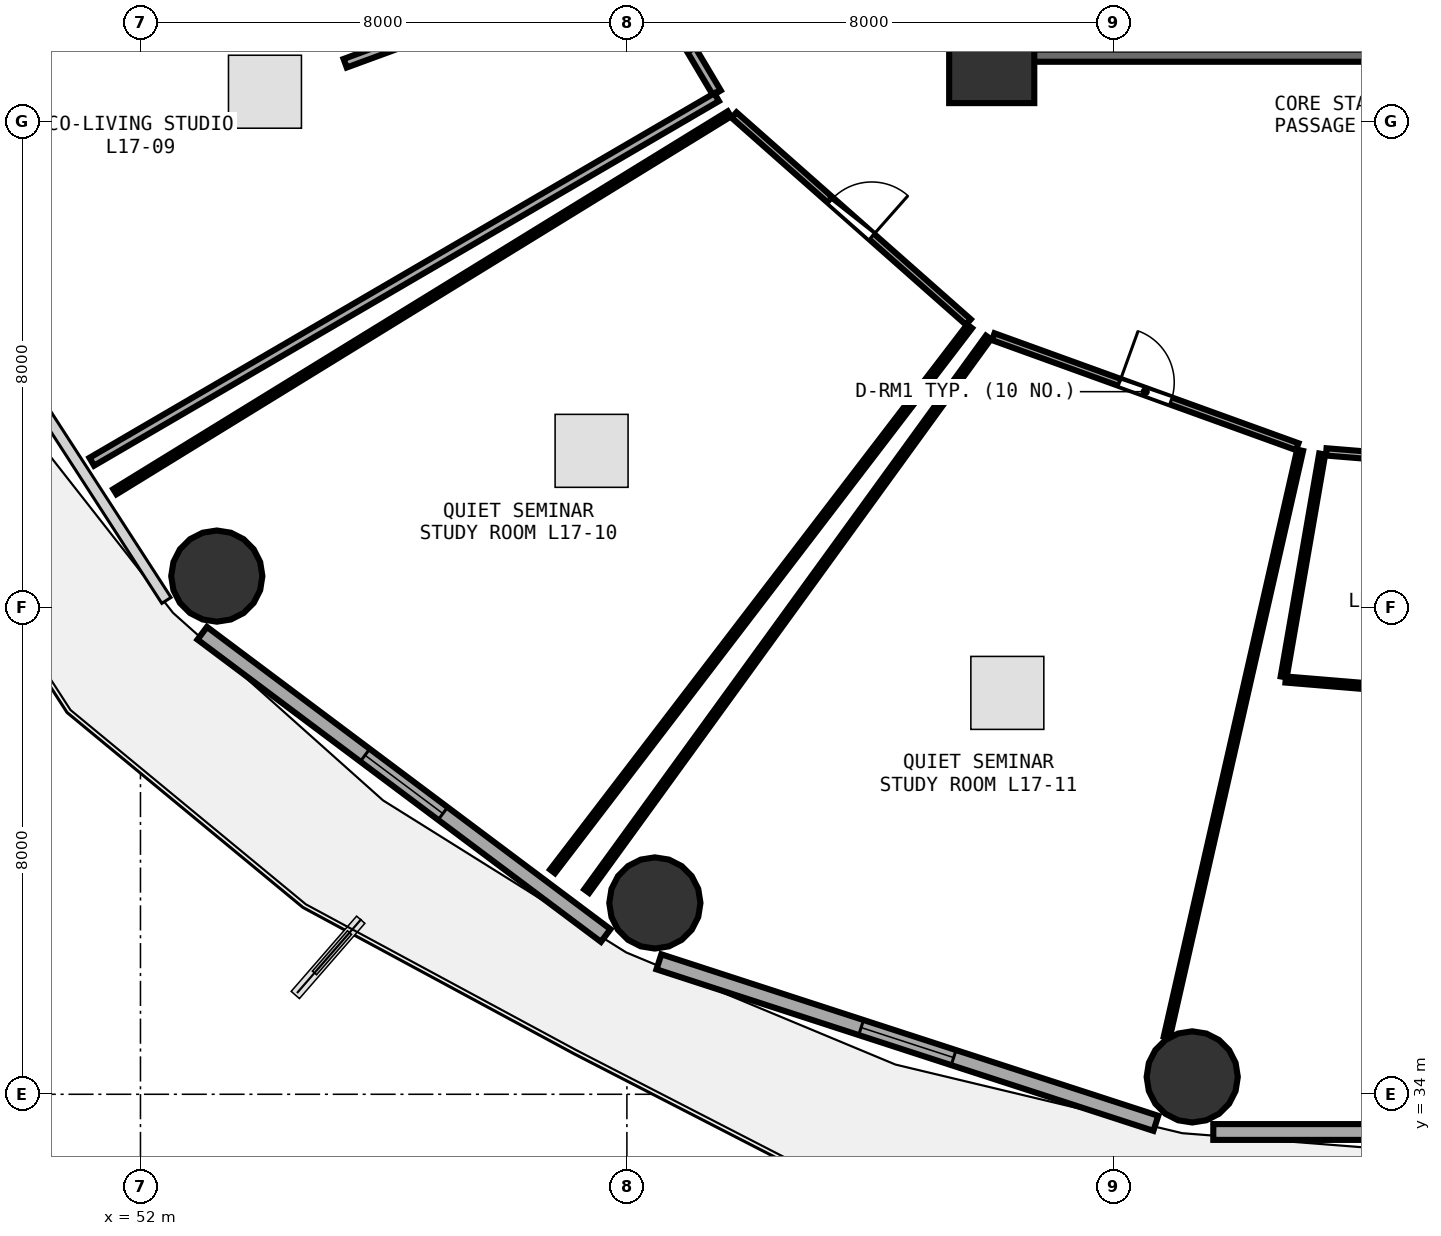
"""IFC4 building model, lengths in metres.
Left out: names, types, materials, properties, quantities, classifications, styles, units other than length and angle.
Written with IfcOpenShell. Run it as: python <this file> out.ifc"""

import sys

from ifc_helpers import new_model, si_unit, direction, frame, frame_2d, origin, origin_2d, place, context, subcontext, project, spatial, rectangle, circle, extrude, element, fill, save


model = new_model("IFC4")
c1 = context("Model", 3, precision=1e-05, world=origin(), true_north=direction((0.0, 1.0)))
c2 = subcontext(c1, "Body", "Model", "MODEL_VIEW")
j1 = project(units=[si_unit("LENGTHUNIT", "METRE"), si_unit("PLANEANGLEUNIT", "RADIAN")], contexts=[c1])
p1 = place(None, origin())
s1 = spatial("IfcSite", under=j1, at=p1, CompositionType="ELEMENT")
p2 = place(p1, origin())
s2 = spatial("IfcBuilding", under=s1, at=p2, CompositionType="ELEMENT")
p3 = place(p2, frame((0.0, 0.0, 67.5)))
s3 = spatial("IfcBuildingStorey", under=s2, at=p3, CompositionType="ELEMENT", Elevation=67.5)
p4 = place(p3, frame((66.0, 51.0, 0.0), z_axis=(0.0, 0.0, 1.0), x_axis=(1.0, 0.0, 0.0)))
e1 = element("IfcColumn", 1, at=p4, inside=s3, PredefinedType="PILASTER", context=c2, shape_type="SweptSolid", body=[
    extrude(rectangle(XDim=1.4, YDim=1.4, at=origin_2d()), origin(), (0.0, 0.0, 1.0), 4.76),
])
for number, where, z_axis, x_axis in (
    (2, (53.256, 42.522, 0.0), (0.0, 0.0, 1.0), (1.0, 0.0, 0.0)),
    (3, (60.46, 37.146, 0.0), (0.0, 0.0, 1.0), (1.0, 0.0, 0.0)),
    (4, (69.298, 34.286, 0.0), (0.0, 0.0, 1.0), (1.0, 0.0, 0.0)),
):
    element("IfcColumn", number, at=place(p3, frame(where, z_axis=z_axis, x_axis=x_axis)), inside=s3, PredefinedType="COLUMN", context=c2, shape_type="SweptSolid", body=[
        extrude(circle(Radius=0.75, at=origin_2d()), origin(), (0.0, 0.0, 1.0), 4.76),
    ])
p5 = place(p3, frame((53.016, 41.582, 0.0), z_axis=(0.0, 0.0, 1.0), x_axis=(0.80030733173, -0.599590005569, 0.0)))
e5 = element("IfcWall", 5, at=p5, inside=s3, PredefinedType="SOLIDWALL", context=c2, shape_type="SweptSolid", body=[
    extrude(rectangle(XDim=8.291, YDim=0.26, at=frame_2d((4.145, 0.0))), origin(), (0.0, 0.0, 1.0), 4.345),
])
p6 = place(p5, frame((3.345, 0.0, 0.85)))
e6 = element("IfcOpeningElement", 6, at=p6, cuts=e5, PredefinedType="OPENING", context=c2, shape_type="SweptSolid", body=[
    extrude(rectangle(XDim=1.6, YDim=1.45, at=frame_2d((0.8, 0.725))), frame((0.0, 0.14, 0.0), z_axis=(0.0, -1.0, 0.0), x_axis=(1.0, 0.0, 0.0)), (0.0, 0.0, 1.0), 0.28),
])
p7 = place(p3, frame((60.526, 36.178, 0.0), z_axis=(0.0, 0.0, 1.0), x_axis=(0.951039914291, -0.309068085421, 0.0)))
e7 = element("IfcWall", 7, at=p7, inside=s3, PredefinedType="SOLIDWALL", context=c2, shape_type="SweptSolid", body=[
    extrude(rectangle(XDim=8.594, YDim=0.26, at=frame_2d((4.297, 0.0))), origin(), (0.0, 0.0, 1.0), 4.345),
])
p8 = place(p7, frame((3.497, 0.0, 0.85)))
e8 = element("IfcOpeningElement", 8, at=p8, cuts=e7, PredefinedType="OPENING", context=c2, shape_type="SweptSolid", body=[
    extrude(rectangle(XDim=1.6, YDim=1.45, at=frame_2d((0.8, 0.725))), frame((0.0, 0.14, 0.0), z_axis=(0.0, -1.0, 0.0), x_axis=(1.0, 0.0, 0.0)), (0.0, 0.0, 1.0), 0.28),
])
p9 = place(p3, frame((69.644, 33.38, 0.0), z_axis=(0.0, 0.0, 1.0), x_axis=(1.0, 0.0, 0.0)))
e9 = element("IfcWall", 9, at=p9, inside=s3, PredefinedType="SOLIDWALL", context=c2, shape_type="SweptSolid", body=[
    extrude(rectangle(XDim=8.712, YDim=0.26, at=frame_2d((4.356, 0.0))), origin(), (0.0, 0.0, 1.0), 4.345),
])
p10 = place(p9, frame((2.476, 0.0, 0.85)))
e10 = element("IfcOpeningElement", 10, at=p10, cuts=e9, PredefinedType="OPENING", context=c2, shape_type="SweptSolid", body=[
    extrude(rectangle(XDim=1.6, YDim=1.45, at=frame_2d((0.8, 0.725))), frame((0.0, 0.14, 0.0), z_axis=(0.0, -1.0, 0.0), x_axis=(1.0, 0.0, 0.0)), (0.0, 0.0, 1.0), 0.28),
])
p11 = place(p3, frame((66.26, 51.08, 0.0), z_axis=(0.0, 0.0, 1.0), x_axis=(1.0, 0.0, 0.0)))
e11 = element("IfcWall", 11, at=p11, inside=s3, PredefinedType="SHEAR", context=c2, shape_type="SweptSolid", body=[
    extrude(rectangle(XDim=7.16, YDim=0.2, at=frame_2d((3.58, 0.0))), origin(), (0.0, 0.0, 1.0), 4.36),
])
p12 = place(p3, frame((60.179, 52.659, 0.0), z_axis=(0.0, 0.0, 1.0), x_axis=(0.510684908265, -0.859767948036, 0.0)))
e12 = element("IfcWall", 12, at=p12, inside=s3, PredefinedType="PARTITIONING", context=c2, shape_type="SweptSolid", body=[
    extrude(rectangle(XDim=2.547, YDim=0.15, at=frame_2d((1.273, 0.0))), origin(), (0.0, 0.0, 1.0), 2.345),
])
p13 = place(p12, frame((0.799, 0.0, 0.0)))
e13 = element("IfcOpeningElement", 13, at=p13, cuts=e12, PredefinedType="OPENING", context=c2, shape_type="SweptSolid", body=[
    extrude(rectangle(XDim=0.95, YDim=2.08, at=frame_2d((0.475, 1.04))), frame((0.0, 0.085, 0.0), z_axis=(0.0, -1.0, 0.0), x_axis=(1.0, 0.0, 0.0)), (0.0, 0.0, 1.0), 0.17),
])
p14 = place(p3, frame((61.763, 50.103, 0.0), z_axis=(0.0, 0.0, 1.0), x_axis=(0.749467713759, -0.662040894532, 0.0)))
e14 = element("IfcWall", 14, at=p14, inside=s3, PredefinedType="PARTITIONING", context=c2, shape_type="SweptSolid", body=[
    extrude(rectangle(XDim=5.141, YDim=0.12, at=frame_2d((2.571, 0.0))), origin(), (0.0, 0.0, 1.0), 2.345),
])
p15 = place(p14, frame((2.121, 0.0, 0.0)))
e15 = element("IfcOpeningElement", 15, at=p15, cuts=e14, PredefinedType="OPENING", context=c2, shape_type="SweptSolid", body=[
    extrude(rectangle(XDim=0.9, YDim=2.08, at=frame_2d((0.45, 1.04))), frame((0.0, 0.07, 0.0), z_axis=(0.0, -1.0, 0.0), x_axis=(1.0, 0.0, 0.0)), (0.0, 0.0, 1.0), 0.14),
])
p16 = place(p3, frame((66.025, 46.458, 0.0), z_axis=(0.0, 0.0, 1.0), x_axis=(0.940384663849, -0.340112751891, 0.0)))
e16 = element("IfcWall", 16, at=p16, inside=s3, PredefinedType="PARTITIONING", context=c2, shape_type="SweptSolid", body=[
    extrude(rectangle(XDim=5.316, YDim=0.12, at=frame_2d((2.658, 0.0))), origin(), (0.0, 0.0, 1.0), 2.345),
])
p17 = place(p16, frame((2.208, 0.0, 0.0)))
e17 = element("IfcOpeningElement", 17, at=p17, cuts=e16, PredefinedType="OPENING", context=c2, shape_type="SweptSolid", body=[
    extrude(rectangle(XDim=0.9, YDim=2.08, at=frame_2d((0.45, 1.04))), frame((0.0, 0.07, 0.0), z_axis=(0.0, -1.0, 0.0), x_axis=(1.0, 0.0, 0.0)), (0.0, 0.0, 1.0), 0.14),
])
p18 = place(p3, frame((71.502, 44.564, 0.0), z_axis=(0.0, 0.0, 1.0), x_axis=(0.996697953598, -0.081198456222, 0.0)))
e18 = element("IfcWall", 18, at=p18, inside=s3, PredefinedType="PARTITIONING", context=c2, shape_type="SweptSolid", body=[
    extrude(rectangle(XDim=2.33, YDim=0.12, at=frame_2d((1.165, 0.0))), origin(), (0.0, 0.0, 1.0), 4.35),
])
p19 = place(p18, frame((0.715, 0.0, 0.0)))
e19 = element("IfcOpeningElement", 19, at=p19, cuts=e18, PredefinedType="OPENING", context=c2, shape_type="SweptSolid", body=[
    extrude(rectangle(XDim=0.9, YDim=2.08, at=frame_2d((0.45, 1.04))), frame((0.0, 0.07, 0.0), z_axis=(0.0, -1.0, 0.0), x_axis=(1.0, 0.0, 0.0)), (0.0, 0.0, 1.0), 0.14),
])
p20 = place(p3, frame((61.476, 50.398, 0.0), z_axis=(0.0, 0.0, 1.0), x_axis=(-0.863734985538, -0.503946301462, 0.0)))
e20 = element("IfcWall", 20, at=p20, inside=s3, PredefinedType="PARTITIONING", context=c2, shape_type="SweptSolid", body=[
    extrude(rectangle(XDim=11.897, YDim=0.15, at=frame_2d((5.949, 0.0))), origin(), (0.0, 0.0, 1.0), 2.345),
])
p21 = place(p3, frame((55.366, 50.956, 0.0), z_axis=(0.0, 0.0, 1.0), x_axis=(0.938773982481, 0.344533612028, 0.0)))
e21 = element("IfcWall", 21, at=p21, inside=s3, PredefinedType="PARTITIONING", context=c2, shape_type="SweptSolid", body=[
    extrude(rectangle(XDim=2.057, YDim=0.15, at=frame_2d((1.029, 0.0))), origin(), (0.0, 0.0, 1.0), 2.345),
])
p22 = place(p3, frame((65.637, 46.628, 0.0), z_axis=(0.0, 0.0, 1.0), x_axis=(-0.607772837178, -0.79411093582, 0.0)))
e22 = element("IfcWall", 22, at=p22, inside=s3, PredefinedType="PARTITIONING", context=c2, shape_type="SweptSolid", body=[
    extrude(rectangle(XDim=11.286, YDim=0.1, at=frame_2d((5.643, 0.0))), origin(), (0.0, 0.0, 1.0), 2.345),
])
p23 = place(p3, frame((51.579, 43.91, 0.0), z_axis=(0.0, 0.0, 1.0), x_axis=(0.851889323335, 0.523721854412, 0.0)))
e23 = element("IfcWall", 23, at=p23, inside=s3, PredefinedType="PARTITIONING", context=c2, shape_type="SweptSolid", body=[
    extrude(rectangle(XDim=11.862, YDim=0.1, at=frame_2d((5.931, 0.0))), origin(), (0.0, 0.0, 1.0), 2.345),
])
p24 = place(p3, frame((71.072, 44.591, 0.0), z_axis=(0.0, 0.0, 1.0), x_axis=(-0.221583796209, -0.975141333991, 0.0)))
e24 = element("IfcWall", 24, at=p24, inside=s3, PredefinedType="PARTITIONING", context=c2, shape_type="SweptSolid", body=[
    extrude(rectangle(XDim=9.9, YDim=0.1, at=frame_2d((4.95, 0.0))), origin(), (0.0, 0.0, 1.0), 2.345),
])
p25 = place(p3, frame((59.34, 37.34, 0.0), z_axis=(0.0, 0.0, 1.0), x_axis=(0.587198342421, 0.809443084261, 0.0)))
e25 = element("IfcWall", 25, at=p25, inside=s3, PredefinedType="PARTITIONING", context=c2, shape_type="SweptSolid", body=[
    extrude(rectangle(XDim=11.25, YDim=0.1, at=frame_2d((5.625, 0.0))), origin(), (0.0, 0.0, 1.0), 2.345),
])
p26 = place(p3, frame((73.814, 40.574, 0.0), z_axis=(0.0, 0.0, 1.0), x_axis=(-0.996592348138, 0.08248449329, 0.0)))
e26 = element("IfcWall", 26, at=p26, inside=s3, PredefinedType="PARTITIONING", context=c2, shape_type="SweptSolid", body=[
    extrude(rectangle(XDim=2.99, YDim=0.1, at=frame_2d((1.495, 0.0))), origin(), (0.0, 0.0, 1.0), 4.35),
])
p27 = place(p3, frame((70.802, 40.863, 0.0), z_axis=(0.0, 0.0, 1.0), x_axis=(0.170280460959, 0.985395638622, 0.0)))
e27 = element("IfcWall", 27, at=p27, inside=s3, PredefinedType="PARTITIONING", context=c2, shape_type="SweptSolid", body=[
    extrude(rectangle(XDim=3.721, YDim=0.1, at=frame_2d((1.86, 0.0))), origin(), (0.0, 0.0, 1.0), 4.045),
])
p28 = place(p6, origin())
e28 = element("IfcWindow", 28, at=p28, inside=s3, PartitioningType="SINGLE_PANEL", PredefinedType="WINDOW", context=c2, shape_type="SweptSolid", body=[
    extrude(rectangle(XDim=1.6, YDim=1.45, at=frame_2d((0.8, 0.725))), frame((0.0, 0.03, 0.0), z_axis=(0.0, -1.0, 0.0), x_axis=(1.0, 0.0, 0.0)), (0.0, 0.0, 1.0), 0.06),
])
fill(e6, e28)
p29 = place(p8, origin())
e29 = element("IfcWindow", 29, at=p29, inside=s3, PartitioningType="SINGLE_PANEL", PredefinedType="WINDOW", context=c2, shape_type="SweptSolid", body=[
    extrude(rectangle(XDim=1.6, YDim=1.45, at=frame_2d((0.8, 0.725))), frame((0.0, 0.03, 0.0), z_axis=(0.0, -1.0, 0.0), x_axis=(1.0, 0.0, 0.0)), (0.0, 0.0, 1.0), 0.06),
])
fill(e8, e29)
p30 = place(p13, origin())
e30 = element("IfcDoor", 30, at=p30, inside=s3, OperationType="SINGLE_SWING_LEFT", PredefinedType="DOOR", context=c2, shape_type="SweptSolid", body=[
    extrude(rectangle(XDim=0.95, YDim=2.08, at=frame_2d((0.475, 1.04))), frame((0.0, 0.025, 0.0), z_axis=(0.0, -1.0, 0.0), x_axis=(1.0, 0.0, 0.0)), (0.0, 0.0, 1.0), 0.05),
])
fill(e13, e30)
p31 = place(p15, origin())
e31 = element("IfcDoor", 31, at=p31, inside=s3, OperationType="SINGLE_SWING_RIGHT", PredefinedType="DOOR", context=c2, shape_type="SweptSolid", body=[
    extrude(rectangle(XDim=0.9, YDim=2.08, at=frame_2d((0.45, 1.04))), frame((0.0, 0.025, 0.0), z_axis=(0.0, -1.0, 0.0), x_axis=(1.0, 0.0, 0.0)), (0.0, 0.0, 1.0), 0.05),
])
fill(e15, e31)
p32 = place(p17, origin())
e32 = element("IfcDoor", 32, at=p32, inside=s3, OperationType="SINGLE_SWING_LEFT", PredefinedType="DOOR", context=c2, shape_type="SweptSolid", body=[
    extrude(rectangle(XDim=0.9, YDim=2.08, at=frame_2d((0.45, 1.04))), frame((0.0, 0.025, 0.0), z_axis=(0.0, -1.0, 0.0), x_axis=(1.0, 0.0, 0.0)), (0.0, 0.0, 1.0), 0.05),
])
fill(e17, e32)
save(model, sys.argv[1])
